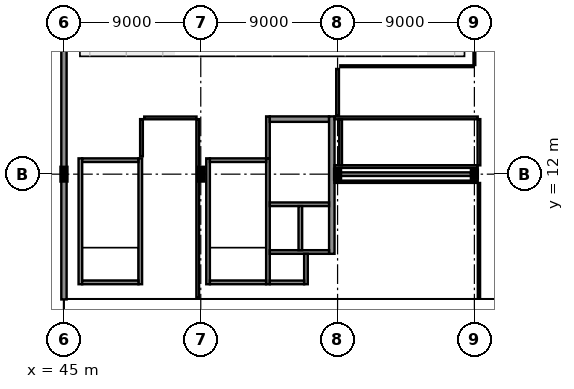
"""IFC4 building model, lengths in metres.
Left out: names, types, materials, properties, quantities, classifications, styles, units other than length and angle.
Written with IfcOpenShell. Run it as: python <this file> out.ifc"""

import sys

from ifc_helpers import new_model, si_unit, direction, frame, frame_2d, origin, origin_2d, place, context, subcontext, project, spatial, rectangle, i_section, extrude, element, fill, save


model = new_model("IFC4")
c1 = context("Model", 3, precision=1e-05, world=origin(), true_north=direction((0.0, 1.0)))
c2 = subcontext(c1, "Body", "Model", "MODEL_VIEW")
j1 = project(units=[si_unit("LENGTHUNIT", "METRE"), si_unit("PLANEANGLEUNIT", "RADIAN")], contexts=[c1])
p1 = place(None, origin())
s1 = spatial("IfcSite", under=j1, at=p1, CompositionType="ELEMENT")
p2 = place(p1, origin())
s2 = spatial("IfcBuilding", under=s1, at=p2, CompositionType="ELEMENT")
p3 = place(p2, origin())
s3 = spatial("IfcBuildingStorey", under=s2, at=p3, CompositionType="ELEMENT", Elevation=0.0)
for number, where, z_axis, x_axis in (
    (1, (45.0, 12.0, 0.0), (0.0, 0.0, 1.0), (1.0, 0.0, 0.0)),
    (2, (54.0, 12.0, 0.0), (0.0, 0.0, 1.0), (1.0, 0.0, 0.0)),
):
    element("IfcColumn", number, at=place(p3, frame(where, z_axis=z_axis, x_axis=x_axis)), inside=s3, PredefinedType="COLUMN", context=c2, shape_type="SweptSolid", body=[
        extrude(i_section(OverallWidth=0.303, OverallDepth=0.814, WebThickness=0.021, FlangeThickness=0.04, at=origin_2d()), origin(), (0.0, 0.0, 1.0), 5.4),
    ])
p4 = place(p3, frame((63.0, 12.0, 0.0), z_axis=(0.0, 0.0, 1.0), x_axis=(1.0, 0.0, 0.0)))
e3 = element("IfcColumn", 3, at=p4, inside=s3, PredefinedType="COLUMN", context=c2, shape_type="SweptSolid", body=[
    extrude(i_section(OverallWidth=0.3, OverallDepth=0.55, WebThickness=0.015, FlangeThickness=0.029, at=origin_2d()), origin(), (0.0, 0.0, 1.0), 5.4),
])
p5 = place(p3, frame((72.0, 12.0, 0.0), z_axis=(0.0, 0.0, 1.0), x_axis=(0.0, 1.0, 0.0)))
e4 = element("IfcColumn", 4, at=p5, inside=s3, PredefinedType="COLUMN", context=c2, shape_type="SweptSolid", body=[
    extrude(i_section(OverallWidth=0.3, OverallDepth=0.45, WebThickness=0.014, FlangeThickness=0.026, at=origin_2d()), origin(), (0.0, 0.0, 1.0), 5.4),
])
p6 = place(p3, frame((45.0, 23.595, 0.0), z_axis=(0.0, 0.0, 1.0), x_axis=(0.0, -1.0, 0.0)))
e5 = element("IfcWall", 5, at=p6, inside=s3, PredefinedType="SOLIDWALL", context=c2, shape_type="SweptSolid", body=[
    extrude(rectangle(XDim=11.19, YDim=0.35, at=frame_2d((5.595, 0.0))), origin(), (0.0, 0.0, 1.0), 4.725),
])
p7 = place(p6, frame((4.595, 0.0, 0.0)))
e6 = element("IfcOpeningElement", 6, at=p7, cuts=e5, PredefinedType="OPENING", context=c2, shape_type="SweptSolid", body=[
    extrude(rectangle(XDim=2.4, YDim=2.8, at=frame_2d((1.2, 1.4))), frame((0.0, 0.19, 0.0), z_axis=(0.0, -1.0, 0.0), x_axis=(1.0, 0.0, 0.0)), (0.0, 0.0, 1.0), 0.38),
])
p8 = place(p6, frame((8.09, 0.0, 0.0)))
e7 = element("IfcOpeningElement", 7, at=p8, cuts=e5, PredefinedType="OPENING", context=c2, shape_type="SweptSolid", body=[
    extrude(rectangle(XDim=1.8, YDim=2.4, at=frame_2d((0.9, 1.2))), frame((0.0, 0.19, 0.0), z_axis=(0.0, -1.0, 0.0), x_axis=(1.0, 0.0, 0.0)), (0.0, 0.0, 1.0), 0.38),
])
p9 = place(p3, frame((45.0, 11.595, 0.0), z_axis=(0.0, 0.0, 1.0), x_axis=(0.0, -1.0, 0.0)))
e8 = element("IfcWall", 8, at=p9, inside=s3, PredefinedType="SOLIDWALL", context=c2, shape_type="SweptSolid", body=[
    extrude(rectangle(XDim=7.835, YDim=0.35, at=frame_2d((3.917, 0.0))), origin(), (0.0, 0.0, 1.0), 4.725),
])
p10 = place(p9, frame((2.317, 0.0, 0.85)))
e9 = element("IfcOpeningElement", 9, at=p10, cuts=e8, PredefinedType="OPENING", context=c2, shape_type="SweptSolid", body=[
    extrude(rectangle(XDim=3.2, YDim=1.8, at=frame_2d((1.6, 0.9))), frame((0.0, 0.19, 0.0), z_axis=(0.0, -1.0, 0.0), x_axis=(1.0, 0.0, 0.0)), (0.0, 0.0, 1.0), 0.38),
])
p11 = place(p3, frame((54.48, 4.76, 0.0), z_axis=(0.0, 0.0, 1.0), x_axis=(0.0, 1.0, 0.0)))
e10 = element("IfcWall", 10, at=p11, inside=s3, PredefinedType="SHEAR", context=c2, shape_type="SweptSolid", body=[
    extrude(rectangle(XDim=8.28, YDim=0.24, at=frame_2d((4.14, 0.0))), origin(), (0.0, 0.0, 1.0), 5.21),
])
p12 = place(p3, frame((58.42, 4.76, 0.0), z_axis=(0.0, 0.0, 1.0), x_axis=(0.0, 1.0, 0.0)))
e11 = element("IfcWall", 11, at=p12, inside=s3, PredefinedType="SHEAR", context=c2, shape_type="SweptSolid", body=[
    extrude(rectangle(XDim=8.28, YDim=0.24, at=frame_2d((4.14, 0.0))), origin(), (0.0, 0.0, 1.0), 5.21),
])
p13 = place(p12, frame((6.49, 0.0, 0.0)))
e12 = element("IfcOpeningElement", 12, at=p13, cuts=e11, PredefinedType="OPENING", context=c2, shape_type="SweptSolid", body=[
    extrude(rectangle(XDim=1.3, YDim=2.2, at=frame_2d((0.65, 1.1))), frame((0.0, 0.135, 0.0), z_axis=(0.0, -1.0, 0.0), x_axis=(1.0, 0.0, 0.0)), (0.0, 0.0, 1.0), 0.27),
])
for number, where, z_axis, x_axis in (
    (13, (54.6, 4.88, 0.0), (0.0, 0.0, 1.0), (1.0, 0.0, 0.0)),
    (14, (54.6, 12.92, 0.0), (0.0, 0.0, 1.0), (1.0, 0.0, 0.0)),
):
    element("IfcWall", number, at=place(p3, frame(where, z_axis=z_axis, x_axis=x_axis)), inside=s3, PredefinedType="SHEAR", context=c2, shape_type="SweptSolid", body=[
        extrude(rectangle(XDim=3.7, YDim=0.24, at=frame_2d((1.85, 0.0))), origin(), (0.0, 0.0, 1.0), 5.21),
    ])
p14 = place(p3, frame((46.08, 4.76, 0.0), z_axis=(0.0, 0.0, 1.0), x_axis=(0.0, 1.0, 0.0)))
e15 = element("IfcWall", 15, at=p14, inside=s3, PredefinedType="SHEAR", context=c2, shape_type="SweptSolid", body=[
    extrude(rectangle(XDim=8.28, YDim=0.24, at=frame_2d((4.14, 0.0))), origin(), (0.0, 0.0, 1.0), 5.21),
])
p15 = place(p3, frame((50.02, 4.76, 0.0), z_axis=(0.0, 0.0, 1.0), x_axis=(0.0, 1.0, 0.0)))
e16 = element("IfcWall", 16, at=p15, inside=s3, PredefinedType="SHEAR", context=c2, shape_type="SweptSolid", body=[
    extrude(rectangle(XDim=8.28, YDim=0.24, at=frame_2d((4.14, 0.0))), origin(), (0.0, 0.0, 1.0), 5.21),
])
p16 = place(p15, frame((6.49, 0.0, 0.0)))
e17 = element("IfcOpeningElement", 17, at=p16, cuts=e16, PredefinedType="OPENING", context=c2, shape_type="SweptSolid", body=[
    extrude(rectangle(XDim=1.3, YDim=2.2, at=frame_2d((0.65, 1.1))), frame((0.0, 0.135, 0.0), z_axis=(0.0, -1.0, 0.0), x_axis=(1.0, 0.0, 0.0)), (0.0, 0.0, 1.0), 0.27),
])
for number, where, z_axis, x_axis in (
    (18, (46.2, 4.88, 0.0), (0.0, 0.0, 1.0), (1.0, 0.0, 0.0)),
    (19, (46.2, 12.92, 0.0), (0.0, 0.0, 1.0), (1.0, 0.0, 0.0)),
):
    element("IfcWall", number, at=place(p3, frame(where, z_axis=z_axis, x_axis=x_axis)), inside=s3, PredefinedType="SHEAR", context=c2, shape_type="SweptSolid", body=[
        extrude(rectangle(XDim=3.7, YDim=0.24, at=frame_2d((1.85, 0.0))), origin(), (0.0, 0.0, 1.0), 5.21),
    ])
p17 = place(p3, frame((58.42, 13.04, 0.0), z_axis=(0.0, 0.0, 1.0), x_axis=(0.0, 1.0, 0.0)))
e20 = element("IfcWall", 20, at=p17, inside=s3, PredefinedType="SHEAR", context=c2, shape_type="SweptSolid", body=[
    extrude(rectangle(XDim=2.76, YDim=0.24, at=frame_2d((1.38, 0.0))), origin(), (0.0, 0.0, 1.0), 5.06),
])
p18 = place(p3, frame((58.54, 15.62, 0.0), z_axis=(0.0, 0.0, 1.0), x_axis=(1.0, 0.0, 0.0)))
e21 = element("IfcWall", 21, at=p18, inside=s3, PredefinedType="SHEAR", context=c2, shape_type="SweptSolid", body=[
    extrude(rectangle(XDim=3.9, YDim=0.36, at=frame_2d((1.95, 0.0))), origin(), (0.0, 0.0, 1.0), 5.06),
])
p19 = place(p18, frame((1.15, 0.0, 0.0)))
e22 = element("IfcOpeningElement", 22, at=p19, cuts=e21, PredefinedType="OPENING", context=c2, shape_type="SweptSolid", body=[
    extrude(rectangle(XDim=1.6, YDim=2.25, at=frame_2d((0.8, 1.125))), frame((0.0, 0.195, 0.0), z_axis=(0.0, -1.0, 0.0), x_axis=(1.0, 0.0, 0.0)), (0.0, 0.0, 1.0), 0.39),
])
p20 = place(p3, frame((62.62, 6.76, 0.0), z_axis=(0.0, 0.0, 1.0), x_axis=(0.0, 1.0, 0.0)))
e23 = element("IfcWall", 23, at=p20, inside=s3, PredefinedType="SHEAR", context=c2, shape_type="SweptSolid", body=[
    extrude(rectangle(XDim=9.04, YDim=0.36, at=frame_2d((4.52, 0.0))), origin(), (0.0, 0.0, 1.0), 5.06),
])
p21 = place(p3, frame((58.54, 10.02, 0.0), z_axis=(0.0, 0.0, 1.0), x_axis=(1.0, 0.0, 0.0)))
e24 = element("IfcWall", 24, at=p21, inside=s3, PredefinedType="SHEAR", context=c2, shape_type="SweptSolid", body=[
    extrude(rectangle(XDim=3.9, YDim=0.24, at=frame_2d((1.95, 0.0))), origin(), (0.0, 0.0, 1.0), 5.21),
])
p22 = place(p21, frame((0.235, 0.0, 0.0)))
e25 = element("IfcOpeningElement", 25, at=p22, cuts=e24, PredefinedType="OPENING", context=c2, shape_type="SweptSolid", body=[
    extrude(rectangle(XDim=1.6, YDim=2.3, at=frame_2d((0.8, 1.15))), frame((0.0, 0.135, 0.0), z_axis=(0.0, -1.0, 0.0), x_axis=(1.0, 0.0, 0.0)), (0.0, 0.0, 1.0), 0.27),
])
p23 = place(p21, frame((2.185, 0.0, 0.0)))
e26 = element("IfcOpeningElement", 26, at=p23, cuts=e24, PredefinedType="OPENING", context=c2, shape_type="SweptSolid", body=[
    extrude(rectangle(XDim=1.6, YDim=2.3, at=frame_2d((0.8, 1.15))), frame((0.0, 0.135, 0.0), z_axis=(0.0, -1.0, 0.0), x_axis=(1.0, 0.0, 0.0)), (0.0, 0.0, 1.0), 0.27),
])
p24 = place(p3, frame((58.54, 6.88, 0.0), z_axis=(0.0, 0.0, 1.0), x_axis=(1.0, 0.0, 0.0)))
e27 = element("IfcWall", 27, at=p24, inside=s3, PredefinedType="SHEAR", context=c2, shape_type="SweptSolid", body=[
    extrude(rectangle(XDim=3.9, YDim=0.24, at=frame_2d((1.95, 0.0))), origin(), (0.0, 0.0, 1.0), 5.21),
])
p25 = place(p3, frame((60.55, 7.0, 0.0), z_axis=(0.0, 0.0, 1.0), x_axis=(0.0, 1.0, 0.0)))
e28 = element("IfcWall", 28, at=p25, inside=s3, PredefinedType="SHEAR", context=c2, shape_type="SweptSolid", body=[
    extrude(rectangle(XDim=2.9, YDim=0.24, at=frame_2d((1.45, 0.0))), origin(), (0.0, 0.0, 1.0), 5.21),
])
p26 = place(p3, frame((60.92, 4.76, 0.0), z_axis=(0.0, 0.0, 1.0), x_axis=(0.0, 1.0, 0.0)))
e29 = element("IfcWall", 29, at=p26, inside=s3, PredefinedType="SHEAR", context=c2, shape_type="SweptSolid", body=[
    extrude(rectangle(XDim=2.0, YDim=0.24, at=frame_2d((1.0, 0.0))), origin(), (0.0, 0.0, 1.0), 5.21),
])
p27 = place(p3, frame((58.54, 4.88, 0.0), z_axis=(0.0, 0.0, 1.0), x_axis=(1.0, 0.0, 0.0)))
e30 = element("IfcWall", 30, at=p27, inside=s3, PredefinedType="SHEAR", context=c2, shape_type="SweptSolid", body=[
    extrude(rectangle(XDim=2.26, YDim=0.24, at=frame_2d((1.13, 0.0))), origin(), (0.0, 0.0, 1.0), 5.21),
])
p28 = place(p3, frame((63.008, 12.0, 0.0), z_axis=(0.0, 0.0, 1.0), x_axis=(1.0, 0.0, 0.0)))
e31 = element("IfcWall", 31, at=p28, inside=s3, PredefinedType="SHEAR", context=c2, shape_type="SweptSolid", body=[
    extrude(rectangle(XDim=8.769, YDim=0.24, at=frame_2d((4.385, 0.0))), origin(), (0.0, 0.0, 1.0), 4.535),
])
p29 = place(p3, frame((63.0, 18.92, 0.0), z_axis=(0.0, 0.0, 1.0), x_axis=(0.0, -1.0, 0.0)))
e32 = element("IfcWall", 32, at=p29, inside=s3, PredefinedType="PARTITIONING", context=c2, shape_type="SweptSolid", body=[
    extrude(rectangle(XDim=3.04, YDim=0.18, at=frame_2d((1.52, 0.0))), origin(), (0.0, 0.0, 1.0), 4.635),
])
p30 = place(p29, frame((0.795, 0.0, 0.0)))
e33 = element("IfcOpeningElement", 33, at=p30, cuts=e32, PredefinedType="OPENING", context=c2, shape_type="SweptSolid", body=[
    extrude(rectangle(XDim=1.45, YDim=2.2, at=frame_2d((0.725, 1.1))), frame((0.0, 0.105, 0.0), z_axis=(0.0, -1.0, 0.0), x_axis=(1.0, 0.0, 0.0)), (0.0, 0.0, 1.0), 0.21),
])
p31 = place(p3, frame((50.28, 15.7, 0.0), z_axis=(0.0, 0.0, 1.0), x_axis=(1.0, 0.0, 0.0)))
e34 = element("IfcWall", 34, at=p31, inside=s3, PredefinedType="PARTITIONING", context=c2, shape_type="SweptSolid", body=[
    extrude(rectangle(XDim=3.44, YDim=0.18, at=frame_2d((1.72, 0.0))), origin(), (0.0, 0.0, 1.0), 5.04),
])
p32 = place(p31, frame((0.995, 0.0, 0.0)))
e35 = element("IfcOpeningElement", 35, at=p32, cuts=e34, PredefinedType="OPENING", context=c2, shape_type="SweptSolid", body=[
    extrude(rectangle(XDim=1.45, YDim=2.2, at=frame_2d((0.725, 1.1))), frame((0.0, 0.105, 0.0), z_axis=(0.0, -1.0, 0.0), x_axis=(1.0, 0.0, 0.0)), (0.0, 0.0, 1.0), 0.21),
])
p33 = place(p3, frame((53.8, 15.62, 0.0), z_axis=(0.0, 0.0, 1.0), x_axis=(0.0, -1.0, 0.0)))
e36 = element("IfcWall", 36, at=p33, inside=s3, PredefinedType="PARTITIONING", context=c2, shape_type="SweptSolid", body=[
    extrude(rectangle(XDim=11.745, YDim=0.18, at=frame_2d((5.873, 0.0))), origin(), (0.0, 0.0, 1.0), 4.685),
])
p34 = place(p3, frame((50.1, 15.62, 0.0), z_axis=(0.0, 0.0, 1.0), x_axis=(0.0, -1.0, 0.0)))
e37 = element("IfcWall", 37, at=p34, inside=s3, PredefinedType="PARTITIONING", context=c2, shape_type="SweptSolid", body=[
    extrude(rectangle(XDim=2.44, YDim=0.18, at=frame_2d((1.22, 0.0))), origin(), (0.0, 0.0, 1.0), 5.04),
])
p35 = place(p3, frame((62.795, 15.7, 0.0), z_axis=(0.0, 0.0, 1.0), x_axis=(1.0, 0.0, 0.0)))
e38 = element("IfcWall", 38, at=p35, inside=s3, PredefinedType="PARTITIONING", context=c2, shape_type="SweptSolid", body=[
    extrude(rectangle(XDim=9.425, YDim=0.18, at=frame_2d((4.712, 0.0))), origin(), (0.0, 0.0, 1.0), 5.04),
])
p36 = place(p35, frame((3.987, 0.0, 0.0)))
e39 = element("IfcOpeningElement", 39, at=p36, cuts=e38, PredefinedType="OPENING", context=c2, shape_type="SweptSolid", body=[
    extrude(rectangle(XDim=1.45, YDim=2.3, at=frame_2d((0.725, 1.15))), frame((0.0, 0.105, 0.0), z_axis=(0.0, -1.0, 0.0), x_axis=(1.0, 0.0, 0.0)), (0.0, 0.0, 1.0), 0.21),
])
p37 = place(p35, frame((7.375, 0.0, 1.05)))
e40 = element("IfcOpeningElement", 40, at=p37, cuts=e38, PredefinedType="OPENING", context=c2, shape_type="SweptSolid", body=[
    extrude(rectangle(XDim=1.2, YDim=1.0, at=frame_2d((0.6, 0.5))), frame((0.0, 0.105, 0.0), z_axis=(0.0, -1.0, 0.0), x_axis=(1.0, 0.0, 0.0)), (0.0, 0.0, 1.0), 0.21),
])
p38 = place(p3, frame((72.3, 15.62, 0.0), z_axis=(0.0, 0.0, 1.0), x_axis=(0.0, -1.0, 0.0)))
e41 = element("IfcWall", 41, at=p38, inside=s3, PredefinedType="PARTITIONING", context=c2, shape_type="SweptSolid", body=[
    extrude(rectangle(XDim=3.04, YDim=0.18, at=frame_2d((1.52, 0.0))), origin(), (0.0, 0.0, 1.0), 5.04),
])
p39 = place(p3, frame((72.22, 12.5, 0.0), z_axis=(0.0, 0.0, 1.0), x_axis=(-1.0, 0.0, 0.0)))
e42 = element("IfcWall", 42, at=p39, inside=s3, PredefinedType="PARTITIONING", context=c2, shape_type="SweptSolid", body=[
    extrude(rectangle(XDim=9.425, YDim=0.18, at=frame_2d((4.712, 0.0))), origin(), (0.0, 0.0, 1.0), 5.04),
])
p40 = place(p3, frame((63.2, 12.58, 0.0), z_axis=(0.0, 0.0, 1.0), x_axis=(0.0, 1.0, 0.0)))
e43 = element("IfcWall", 43, at=p40, inside=s3, PredefinedType="PARTITIONING", context=c2, shape_type="SweptSolid", body=[
    extrude(rectangle(XDim=3.04, YDim=0.18, at=frame_2d((1.52, 0.0))), origin(), (0.0, 0.0, 1.0), 4.635),
])
p41 = place(p3, frame((72.3, 11.42, 0.0), z_axis=(0.0, 0.0, 1.0), x_axis=(0.0, -1.0, 0.0)))
e44 = element("IfcWall", 44, at=p41, inside=s3, PredefinedType="PARTITIONING", context=c2, shape_type="SweptSolid", body=[
    extrude(rectangle(XDim=7.545, YDim=0.15, at=frame_2d((3.772, 0.0))), origin(), (0.0, 0.0, 1.0), 5.04),
])
p42 = place(p41, frame((3.248, 0.0, 0.0)))
e45 = element("IfcOpeningElement", 45, at=p42, cuts=e44, PredefinedType="OPENING", context=c2, shape_type="SweptSolid", body=[
    extrude(rectangle(XDim=1.05, YDim=2.25, at=frame_2d((0.525, 1.125))), frame((0.0, 0.09, 0.0), z_axis=(0.0, -1.0, 0.0), x_axis=(1.0, 0.0, 0.0)), (0.0, 0.0, 1.0), 0.18),
])
p43 = place(p3, frame((62.795, 11.5, 0.0), z_axis=(0.0, 0.0, 1.0), x_axis=(1.0, 0.0, 0.0)))
e46 = element("IfcWall", 46, at=p43, inside=s3, PredefinedType="PARTITIONING", context=c2, shape_type="SweptSolid", body=[
    extrude(rectangle(XDim=9.425, YDim=0.15, at=frame_2d((4.712, 0.0))), origin(), (0.0, 0.0, 1.0), 5.04),
])
p44 = place(p3, frame((72.0, 23.52, 0.0), z_axis=(0.0, 0.0, 1.0), x_axis=(0.0, -1.0, 0.0)))
e47 = element("IfcWall", 47, at=p44, inside=s3, PredefinedType="PARTITIONING", context=c2, shape_type="SweptSolid", body=[
    extrude(rectangle(XDim=4.34, YDim=0.12, at=frame_2d((2.17, 0.0))), origin(), (0.0, 0.0, 1.0), 4.585),
])
p45 = place(p3, frame((71.92, 19.1, 0.0), z_axis=(0.0, 0.0, 1.0), x_axis=(-1.0, 0.0, 0.0)))
e48 = element("IfcWall", 48, at=p45, inside=s3, PredefinedType="PARTITIONING", context=c2, shape_type="SweptSolid", body=[
    extrude(rectangle(XDim=8.74, YDim=0.12, at=frame_2d((4.37, 0.0))), origin(), (0.0, 0.0, 1.0), 5.04),
])
p46 = place(p45, frame((3.895, 0.0, 0.0)))
e49 = element("IfcOpeningElement", 49, at=p46, cuts=e48, PredefinedType="OPENING", context=c2, shape_type="SweptSolid", body=[
    extrude(rectangle(XDim=0.95, YDim=2.15, at=frame_2d((0.475, 1.075))), frame((0.0, 0.075, 0.0), z_axis=(0.0, -1.0, 0.0), x_axis=(1.0, 0.0, 0.0)), (0.0, 0.0, 1.0), 0.15),
])
p47 = place(p45, frame((5.79, 0.0, 1.05)))
e50 = element("IfcOpeningElement", 50, at=p47, cuts=e48, PredefinedType="OPENING", context=c2, shape_type="SweptSolid", body=[
    extrude(rectangle(XDim=2.1, YDim=1.2, at=frame_2d((1.05, 0.6))), frame((0.0, 0.075, 0.0), z_axis=(0.0, -1.0, 0.0), x_axis=(1.0, 0.0, 0.0)), (0.0, 0.0, 1.0), 0.15),
])
p48 = place(p7, frame((2.4, 0.0, 0.0), z_axis=(0.0, 0.0, 1.0), x_axis=(-1.0, 0.0, 0.0)))
e51 = element("IfcDoor", 51, at=p48, inside=s3, OperationType="DOUBLE_DOOR_SINGLE_SWING", PredefinedType="DOOR", context=c2, shape_type="SweptSolid", body=[
    extrude(rectangle(XDim=2.4, YDim=2.8, at=frame_2d((1.2, 1.4))), frame((0.0, 0.025, 0.0), z_axis=(0.0, -1.0, 0.0), x_axis=(1.0, 0.0, 0.0)), (0.0, 0.0, 1.0), 0.05),
])
fill(e6, e51)
p49 = place(p8, frame((1.8, 0.0, 0.0), z_axis=(0.0, 0.0, 1.0), x_axis=(-1.0, 0.0, 0.0)))
e52 = element("IfcDoor", 52, at=p49, inside=s3, OperationType="DOUBLE_DOOR_SINGLE_SWING", PredefinedType="DOOR", context=c2, shape_type="SweptSolid", body=[
    extrude(rectangle(XDim=1.8, YDim=2.4, at=frame_2d((0.9, 1.2))), frame((0.0, 0.025, 0.0), z_axis=(0.0, -1.0, 0.0), x_axis=(1.0, 0.0, 0.0)), (0.0, 0.0, 1.0), 0.05),
])
fill(e7, e52)
p50 = place(p10, origin())
e53 = element("IfcWindow", 53, at=p50, inside=s3, PartitioningType="SINGLE_PANEL", PredefinedType="WINDOW", context=c2, shape_type="SweptSolid", body=[
    extrude(rectangle(XDim=3.2, YDim=1.8, at=frame_2d((1.6, 0.9))), frame((0.0, 0.03, 0.0), z_axis=(0.0, -1.0, 0.0), x_axis=(1.0, 0.0, 0.0)), (0.0, 0.0, 1.0), 0.06),
])
fill(e9, e53)
p51 = place(p13, frame((1.3, 0.0, 0.0), z_axis=(0.0, 0.0, 1.0), x_axis=(-1.0, 0.0, 0.0)))
e54 = element("IfcDoor", 54, at=p51, inside=s3, OperationType="SINGLE_SWING_RIGHT", PredefinedType="DOOR", context=c2, shape_type="SweptSolid", body=[
    extrude(rectangle(XDim=1.3, YDim=2.2, at=frame_2d((0.65, 1.1))), frame((0.0, 0.025, 0.0), z_axis=(0.0, -1.0, 0.0), x_axis=(1.0, 0.0, 0.0)), (0.0, 0.0, 1.0), 0.05),
])
fill(e12, e54)
p52 = place(p16, frame((1.3, 0.0, 0.0), z_axis=(0.0, 0.0, 1.0), x_axis=(-1.0, 0.0, 0.0)))
e55 = element("IfcDoor", 55, at=p52, inside=s3, OperationType="SINGLE_SWING_RIGHT", PredefinedType="DOOR", context=c2, shape_type="SweptSolid", body=[
    extrude(rectangle(XDim=1.3, YDim=2.2, at=frame_2d((0.65, 1.1))), frame((0.0, 0.025, 0.0), z_axis=(0.0, -1.0, 0.0), x_axis=(1.0, 0.0, 0.0)), (0.0, 0.0, 1.0), 0.05),
])
fill(e17, e55)
p53 = place(p19, origin())
e56 = element("IfcDoor", 56, at=p53, inside=s3, OperationType="DOUBLE_DOOR_SINGLE_SWING", PredefinedType="DOOR", context=c2, shape_type="SweptSolid", body=[
    extrude(rectangle(XDim=1.6, YDim=2.25, at=frame_2d((0.8, 1.125))), frame((0.0, 0.025, 0.0), z_axis=(0.0, -1.0, 0.0), x_axis=(1.0, 0.0, 0.0)), (0.0, 0.0, 1.0), 0.05),
])
fill(e22, e56)
p54 = place(p22, origin())
e57 = element("IfcDoor", 57, at=p54, inside=s3, OperationType="DOUBLE_DOOR_SLIDING", PredefinedType="DOOR", context=c2, shape_type="SweptSolid", body=[
    extrude(rectangle(XDim=1.6, YDim=2.3, at=frame_2d((0.8, 1.15))), frame((0.0, 0.025, 0.0), z_axis=(0.0, -1.0, 0.0), x_axis=(1.0, 0.0, 0.0)), (0.0, 0.0, 1.0), 0.05),
])
fill(e25, e57)
p55 = place(p23, origin())
e58 = element("IfcDoor", 58, at=p55, inside=s3, OperationType="DOUBLE_DOOR_SLIDING", PredefinedType="DOOR", context=c2, shape_type="SweptSolid", body=[
    extrude(rectangle(XDim=1.6, YDim=2.3, at=frame_2d((0.8, 1.15))), frame((0.0, 0.025, 0.0), z_axis=(0.0, -1.0, 0.0), x_axis=(1.0, 0.0, 0.0)), (0.0, 0.0, 1.0), 0.05),
])
fill(e26, e58)
p56 = place(p30, origin())
e59 = element("IfcDoor", 59, at=p56, inside=s3, OperationType="DOUBLE_DOOR_SINGLE_SWING", PredefinedType="DOOR", context=c2, shape_type="SweptSolid", body=[
    extrude(rectangle(XDim=1.45, YDim=2.2, at=frame_2d((0.725, 1.1))), frame((0.0, 0.025, 0.0), z_axis=(0.0, -1.0, 0.0), x_axis=(1.0, 0.0, 0.0)), (0.0, 0.0, 1.0), 0.05),
])
fill(e33, e59)
p57 = place(p32, origin())
e60 = element("IfcDoor", 60, at=p57, inside=s3, OperationType="DOUBLE_DOOR_SINGLE_SWING", PredefinedType="DOOR", context=c2, shape_type="SweptSolid", body=[
    extrude(rectangle(XDim=1.45, YDim=2.2, at=frame_2d((0.725, 1.1))), frame((0.0, 0.025, 0.0), z_axis=(0.0, -1.0, 0.0), x_axis=(1.0, 0.0, 0.0)), (0.0, 0.0, 1.0), 0.05),
])
fill(e35, e60)
p58 = place(p36, frame((1.45, 0.0, 0.0), z_axis=(0.0, 0.0, 1.0), x_axis=(-1.0, 0.0, 0.0)))
e61 = element("IfcDoor", 61, at=p58, inside=s3, OperationType="DOUBLE_DOOR_SINGLE_SWING", PredefinedType="DOOR", context=c2, shape_type="SweptSolid", body=[
    extrude(rectangle(XDim=1.45, YDim=2.3, at=frame_2d((0.725, 1.15))), frame((0.0, 0.025, 0.0), z_axis=(0.0, -1.0, 0.0), x_axis=(1.0, 0.0, 0.0)), (0.0, 0.0, 1.0), 0.05),
])
fill(e39, e61)
p59 = place(p37, origin())
e62 = element("IfcWindow", 62, at=p59, inside=s3, PartitioningType="SINGLE_PANEL", PredefinedType="WINDOW", context=c2, shape_type="SweptSolid", body=[
    extrude(rectangle(XDim=1.2, YDim=1.0, at=frame_2d((0.6, 0.5))), frame((0.0, 0.03, 0.0), z_axis=(0.0, -1.0, 0.0), x_axis=(1.0, 0.0, 0.0)), (0.0, 0.0, 1.0), 0.06),
])
fill(e40, e62)
p60 = place(p42, origin())
e63 = element("IfcDoor", 63, at=p60, inside=s3, OperationType="SINGLE_SWING_RIGHT", PredefinedType="DOOR", context=c2, shape_type="SweptSolid", body=[
    extrude(rectangle(XDim=1.05, YDim=2.25, at=frame_2d((0.525, 1.125))), frame((0.0, 0.025, 0.0), z_axis=(0.0, -1.0, 0.0), x_axis=(1.0, 0.0, 0.0)), (0.0, 0.0, 1.0), 0.05),
])
fill(e45, e63)
p61 = place(p46, frame((0.95, 0.0, 0.0), z_axis=(0.0, 0.0, 1.0), x_axis=(-1.0, 0.0, 0.0)))
e64 = element("IfcDoor", 64, at=p61, inside=s3, OperationType="SINGLE_SWING_LEFT", PredefinedType="DOOR", context=c2, shape_type="SweptSolid", body=[
    extrude(rectangle(XDim=0.95, YDim=2.15, at=frame_2d((0.475, 1.075))), frame((0.0, 0.025, 0.0), z_axis=(0.0, -1.0, 0.0), x_axis=(1.0, 0.0, 0.0)), (0.0, 0.0, 1.0), 0.05),
])
fill(e49, e64)
p62 = place(p47, origin())
e65 = element("IfcWindow", 65, at=p62, inside=s3, PartitioningType="SINGLE_PANEL", PredefinedType="WINDOW", context=c2, shape_type="SweptSolid", body=[
    extrude(rectangle(XDim=2.1, YDim=1.2, at=frame_2d((1.05, 0.6))), frame((0.0, 0.03, 0.0), z_axis=(0.0, -1.0, 0.0), x_axis=(1.0, 0.0, 0.0)), (0.0, 0.0, 1.0), 0.06),
])
fill(e50, e65)
save(model, sys.argv[1])
